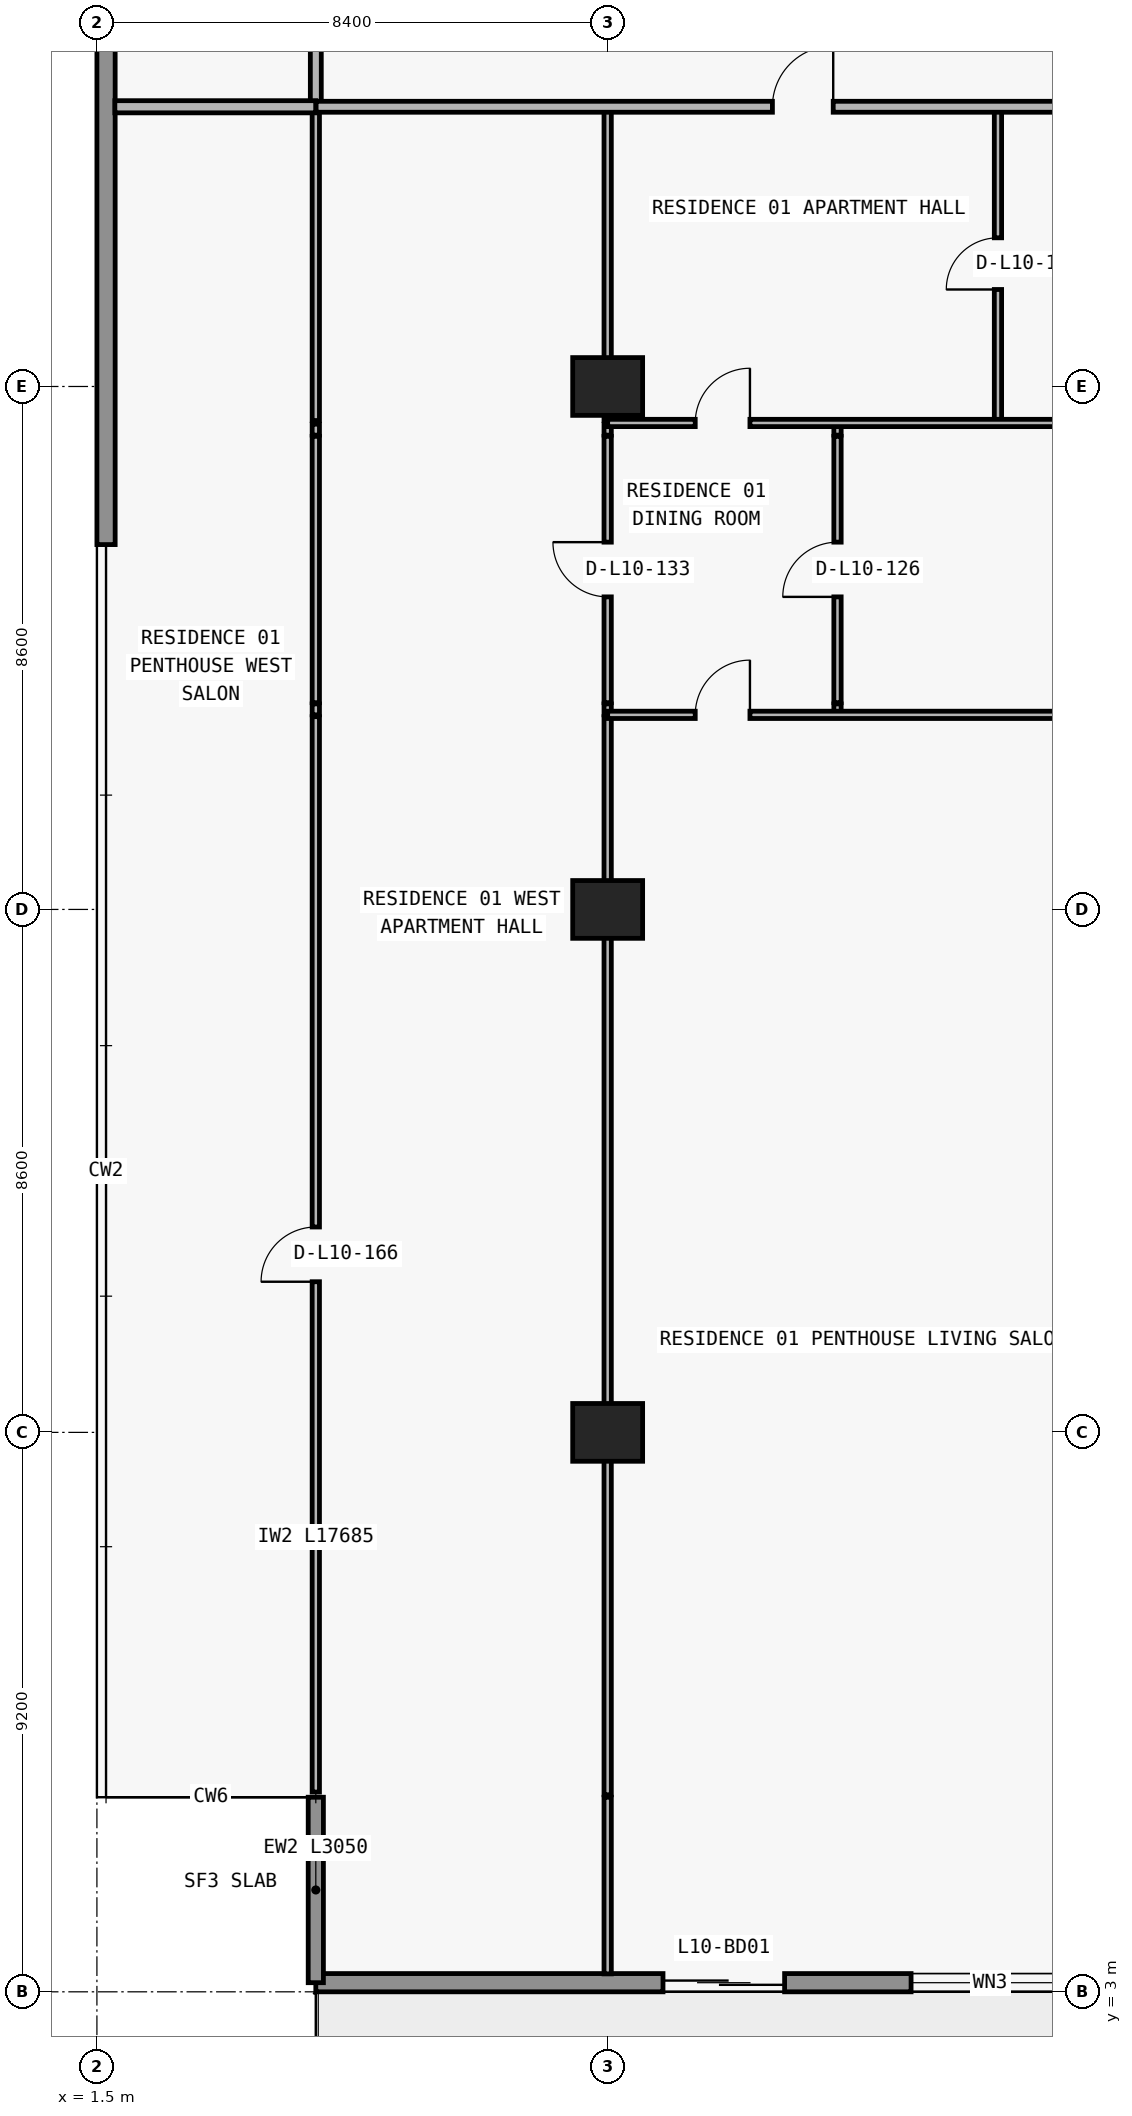
"""IFC4 building model, lengths in metres.
Left out: names, types, materials, properties, quantities, classifications, styles, units other than length and angle.
Written with IfcOpenShell. Run it as: python <this file> out.ifc"""

import sys

from ifc_helpers import new_model, si_unit, direction, frame, frame_2d, origin, origin_2d, place, context, subcontext, project, spatial, rectangle, extrude, element, fill, save


model = new_model("IFC4")
c1 = context("Model", 3, precision=1e-05, world=origin(), true_north=direction((0.0, 1.0)))
c2 = subcontext(c1, "Body", "Model", "MODEL_VIEW")
j1 = project(units=[si_unit("LENGTHUNIT", "METRE"), si_unit("PLANEANGLEUNIT", "RADIAN")], contexts=[c1])
p1 = place(None, origin())
s1 = spatial("IfcSite", under=j1, at=p1, CompositionType="ELEMENT")
p2 = place(p1, origin())
s2 = spatial("IfcBuilding", under=s1, at=p2, CompositionType="ELEMENT")
p3 = place(p2, frame((0.0, 0.0, 43.2)))
s3 = spatial("IfcBuildingStorey", under=s2, at=p3, CompositionType="ELEMENT", Elevation=43.2)
for number, where, z_axis, x_axis in (
    (1, (9.9, 12.2, 0.0), (0.0, 0.0, 1.0), (1.0, 0.0, 0.0)),
    (2, (9.9, 20.8, 0.0), (0.0, 0.0, 1.0), (1.0, 0.0, 0.0)),
    (3, (9.9, 29.4, 0.0), (0.0, 0.0, 1.0), (1.0, 0.0, 0.0)),
):
    element("IfcColumn", number, at=place(p3, frame(where, z_axis=z_axis, x_axis=x_axis)), inside=s3, PredefinedType="COLUMN", context=c2, shape_type="SweptSolid", body=[
        extrude(rectangle(XDim=1.15, YDim=0.95, at=origin_2d()), origin(), (0.0, 0.0, 1.0), 3.05),
    ])
p4 = place(p3, frame((72.7, 3.15, 0.0), z_axis=(0.0, 0.0, 1.0), x_axis=(-1.0, 0.0, 0.0)))
e4 = element("IfcWall", 4, at=p4, inside=s3, PredefinedType="STANDARD", context=c2, shape_type="SweptSolid", body=[
    extrude(rectangle(XDim=67.6, YDim=0.3, at=frame_2d((33.8, 0.0))), origin(), (0.0, 0.0, 1.0), 3.05),
])
p5 = place(p4, frame((59.89, 0.0, 0.0)))
e5 = element("IfcOpeningElement", 5, at=p5, cuts=e4, PredefinedType="OPENING", context=c2, shape_type="SweptSolid", body=[
    extrude(rectangle(XDim=2.0, YDim=2.3, at=frame_2d((1.0, 1.15))), frame((0.0, 0.16, 0.0), z_axis=(0.0, -1.0, 0.0), x_axis=(1.0, 0.0, 0.0)), (0.0, 0.0, 1.0), 0.32),
])
p6 = place(p4, frame((55.21, 0.0, 0.65)))
e6 = element("IfcOpeningElement", 6, at=p6, cuts=e4, PredefinedType="OPENING", context=c2, shape_type="SweptSolid", body=[
    extrude(rectangle(XDim=2.6, YDim=1.85, at=frame_2d((1.3, 0.925))), frame((0.0, 0.16, 0.0), z_axis=(0.0, -1.0, 0.0), x_axis=(1.0, 0.0, 0.0)), (0.0, 0.0, 1.0), 0.32),
])
p7 = place(p4, frame((49.1, 0.0, 0.85)))
e7 = element("IfcOpeningElement", 7, at=p7, cuts=e4, PredefinedType="OPENING", context=c2, shape_type="SweptSolid", body=[
    extrude(rectangle(XDim=2.2, YDim=1.55, at=frame_2d((1.1, 0.775))), frame((0.0, 0.16, 0.0), z_axis=(0.0, -1.0, 0.0), x_axis=(1.0, 0.0, 0.0)), (0.0, 0.0, 1.0), 0.32),
])
p8 = place(p4, frame((42.69, 0.0, 0.0)))
e8 = element("IfcOpeningElement", 8, at=p8, cuts=e4, PredefinedType="OPENING", context=c2, shape_type="SweptSolid", body=[
    extrude(rectangle(XDim=2.0, YDim=2.3, at=frame_2d((1.0, 1.15))), frame((0.0, 0.16, 0.0), z_axis=(0.0, -1.0, 0.0), x_axis=(1.0, 0.0, 0.0)), (0.0, 0.0, 1.0), 0.32),
])
p9 = place(p4, frame((38.59, 0.0, 0.85)))
e9 = element("IfcOpeningElement", 9, at=p9, cuts=e4, PredefinedType="OPENING", context=c2, shape_type="SweptSolid", body=[
    extrude(rectangle(XDim=1.8, YDim=1.55, at=frame_2d((0.9, 0.775))), frame((0.0, 0.16, 0.0), z_axis=(0.0, -1.0, 0.0), x_axis=(1.0, 0.0, 0.0)), (0.0, 0.0, 1.0), 0.32),
])
p10 = place(p4, frame((30.914, 0.0, 0.85)))
e10 = element("IfcOpeningElement", 10, at=p10, cuts=e4, PredefinedType="OPENING", context=c2, shape_type="SweptSolid", body=[
    extrude(rectangle(XDim=2.2, YDim=1.55, at=frame_2d((1.1, 0.775))), frame((0.0, 0.16, 0.0), z_axis=(0.0, -1.0, 0.0), x_axis=(1.0, 0.0, 0.0)), (0.0, 0.0, 1.0), 0.32),
])
p11 = place(p4, frame((26.69, 0.0, 0.0)))
e11 = element("IfcOpeningElement", 11, at=p11, cuts=e4, PredefinedType="OPENING", context=c2, shape_type="SweptSolid", body=[
    extrude(rectangle(XDim=2.0, YDim=2.3, at=frame_2d((1.0, 1.15))), frame((0.0, 0.16, 0.0), z_axis=(0.0, -1.0, 0.0), x_axis=(1.0, 0.0, 0.0)), (0.0, 0.0, 1.0), 0.32),
])
p12 = place(p4, frame((22.59, 0.0, 0.85)))
e12 = element("IfcOpeningElement", 12, at=p12, cuts=e4, PredefinedType="OPENING", context=c2, shape_type="SweptSolid", body=[
    extrude(rectangle(XDim=1.8, YDim=1.55, at=frame_2d((0.9, 0.775))), frame((0.0, 0.16, 0.0), z_axis=(0.0, -1.0, 0.0), x_axis=(1.0, 0.0, 0.0)), (0.0, 0.0, 1.0), 0.32),
])
p13 = place(p4, frame((18.69, 0.0, 0.0)))
e13 = element("IfcOpeningElement", 13, at=p13, cuts=e4, PredefinedType="OPENING", context=c2, shape_type="SweptSolid", body=[
    extrude(rectangle(XDim=2.0, YDim=2.3, at=frame_2d((1.0, 1.15))), frame((0.0, 0.16, 0.0), z_axis=(0.0, -1.0, 0.0), x_axis=(1.0, 0.0, 0.0)), (0.0, 0.0, 1.0), 0.32),
])
p14 = place(p4, frame((14.01, 0.0, 0.65)))
e14 = element("IfcOpeningElement", 14, at=p14, cuts=e4, PredefinedType="OPENING", context=c2, shape_type="SweptSolid", body=[
    extrude(rectangle(XDim=2.6, YDim=1.85, at=frame_2d((1.3, 0.925))), frame((0.0, 0.16, 0.0), z_axis=(0.0, -1.0, 0.0), x_axis=(1.0, 0.0, 0.0)), (0.0, 0.0, 1.0), 0.32),
])
p15 = place(p4, frame((7.9, 0.0, 0.85)))
e15 = element("IfcOpeningElement", 15, at=p15, cuts=e4, PredefinedType="OPENING", context=c2, shape_type="SweptSolid", body=[
    extrude(rectangle(XDim=2.2, YDim=1.55, at=frame_2d((1.1, 0.775))), frame((0.0, 0.16, 0.0), z_axis=(0.0, -1.0, 0.0), x_axis=(1.0, 0.0, 0.0)), (0.0, 0.0, 1.0), 0.32),
])
p16 = place(p3, frame((5.1, 6.2, 0.0), z_axis=(0.0, 0.0, 1.0), x_axis=(0.0, -1.0, 0.0)))
e16 = element("IfcWall", 16, at=p16, inside=s3, PredefinedType="ELEMENTEDWALL", context=c2, shape_type="SweptSolid", body=[
    extrude(rectangle(XDim=3.05, YDim=0.25, at=frame_2d((1.525, 0.0))), origin(), (0.0, 0.0, 1.0), 3.05),
])
p17 = place(p3, frame((1.65, 26.8, 0.0), z_axis=(0.0, 0.0, 1.0), x_axis=(0.0, 1.0, 0.0)))
e17 = element("IfcWall", 17, at=p17, inside=s3, PredefinedType="STANDARD", context=c2, shape_type="SweptSolid", body=[
    extrude(rectangle(XDim=20.6, YDim=0.3, at=frame_2d((10.3, 0.0))), origin(), (0.0, 0.0, 1.0), 3.05),
])
p18 = place(p3, frame((5.1, 6.285, 0.0), z_axis=(0.0, 0.0, 1.0), x_axis=(0.0, 1.0, 0.0)))
e18 = element("IfcWall", 18, at=p18, inside=s3, PredefinedType="PARTITIONING", context=c2, shape_type="SweptSolid", body=[
    extrude(rectangle(XDim=17.685, YDim=0.12, at=frame_2d((8.843, 0.0))), origin(), (0.0, 0.0, 1.0), 3.05),
])
p19 = place(p18, frame((8.393, 0.0, 0.0)))
e19 = element("IfcOpeningElement", 19, at=p19, cuts=e18, PredefinedType="OPENING", context=c2, shape_type="SweptSolid", body=[
    extrude(rectangle(XDim=0.9, YDim=2.15, at=frame_2d((0.45, 1.075))), frame((0.0, 0.07, 0.0), z_axis=(0.0, -1.0, 0.0), x_axis=(1.0, 0.0, 0.0)), (0.0, 0.0, 1.0), 0.14),
])
p20 = place(p3, frame((5.1, 24.0, 0.0), z_axis=(0.0, 0.0, 1.0), x_axis=(0.0, 1.0, 0.0)))
e20 = element("IfcWall", 20, at=p20, inside=s3, PredefinedType="PARTITIONING", context=c2, shape_type="SweptSolid", body=[
    extrude(rectangle(XDim=0.18, YDim=0.12, at=frame_2d((0.09, 0.0))), origin(), (0.0, 0.0, 1.0), 3.05),
])
p21 = place(p3, frame((5.1, 24.2, 0.0), z_axis=(0.0, 0.0, 1.0), x_axis=(0.0, 1.0, 0.0)))
e21 = element("IfcWall", 21, at=p21, inside=s3, PredefinedType="PARTITIONING", context=c2, shape_type="SweptSolid", body=[
    extrude(rectangle(XDim=4.38, YDim=0.12, at=frame_2d((2.19, 0.0))), origin(), (0.0, 0.0, 1.0), 3.05),
])
p22 = place(p3, frame((5.1, 28.6, 0.0), z_axis=(0.0, 0.0, 1.0), x_axis=(0.0, 1.0, 0.0)))
e22 = element("IfcWall", 22, at=p22, inside=s3, PredefinedType="PARTITIONING", context=c2, shape_type="SweptSolid", body=[
    extrude(rectangle(XDim=0.18, YDim=0.12, at=frame_2d((0.09, 0.0))), origin(), (0.0, 0.0, 1.0), 3.05),
])
p23 = place(p3, frame((5.1, 28.84, 0.0), z_axis=(0.0, 0.0, 1.0), x_axis=(0.0, 1.0, 0.0)))
e23 = element("IfcWall", 23, at=p23, inside=s3, PredefinedType="PARTITIONING", context=c2, shape_type="SweptSolid", body=[
    extrude(rectangle(XDim=5.16, YDim=0.12, at=frame_2d((2.58, 0.0))), origin(), (0.0, 0.0, 1.0), 3.05),
])
p24 = place(p3, frame((5.1, 34.005, 0.0), z_axis=(0.0, 0.0, 1.0), x_axis=(0.0, 1.0, 0.0)))
e24 = element("IfcWall", 24, at=p24, inside=s3, PredefinedType="PARTITIONING", context=c2, shape_type="SweptSolid", body=[
    extrude(rectangle(XDim=2.895, YDim=0.18, at=frame_2d((1.448, 0.0))), origin(), (0.0, 0.0, 1.0), 3.05),
])
p25 = place(p3, frame((9.9, 3.295, 0.0), z_axis=(0.0, 0.0, 1.0), x_axis=(0.0, 1.0, 0.0)))
e25 = element("IfcWall", 25, at=p25, inside=s3, PredefinedType="PARTITIONING", context=c2, shape_type="SweptSolid", body=[
    extrude(rectangle(XDim=2.905, YDim=0.12, at=frame_2d((1.453, 0.0))), origin(), (0.0, 0.0, 1.0), 3.05),
])
p26 = place(p3, frame((9.9, 6.24, 0.0), z_axis=(0.0, 0.0, 1.0), x_axis=(0.0, 1.0, 0.0)))
e26 = element("IfcWall", 26, at=p26, inside=s3, PredefinedType="PARTITIONING", context=c2, shape_type="SweptSolid", body=[
    extrude(rectangle(XDim=17.73, YDim=0.12, at=frame_2d((8.865, 0.0))), origin(), (0.0, 0.0, 1.0), 2.11),
])
p27 = place(p3, frame((9.9, 24.0, 0.0), z_axis=(0.0, 0.0, 1.0), x_axis=(0.0, 1.0, 0.0)))
e27 = element("IfcWall", 27, at=p27, inside=s3, PredefinedType="PARTITIONING", context=c2, shape_type="SweptSolid", body=[
    extrude(rectangle(XDim=0.18, YDim=0.12, at=frame_2d((0.09, 0.0))), origin(), (0.0, 0.0, 1.0), 2.11),
])
p28 = place(p3, frame((9.9, 24.2, 0.0), z_axis=(0.0, 0.0, 1.0), x_axis=(0.0, 1.0, 0.0)))
e28 = element("IfcWall", 28, at=p28, inside=s3, PredefinedType="PARTITIONING", context=c2, shape_type="SweptSolid", body=[
    extrude(rectangle(XDim=4.38, YDim=0.12, at=frame_2d((2.19, 0.0))), origin(), (0.0, 0.0, 1.0), 2.11),
])
p29 = place(p28, frame((1.74, 0.0, 0.0)))
e29 = element("IfcOpeningElement", 29, at=p29, cuts=e28, PredefinedType="OPENING", context=c2, shape_type="SweptSolid", body=[
    extrude(rectangle(XDim=0.9, YDim=2.06, at=frame_2d((0.45, 1.03))), frame((0.0, 0.07, 0.0), z_axis=(0.0, -1.0, 0.0), x_axis=(1.0, 0.0, 0.0)), (0.0, 0.0, 1.0), 0.14),
])
p30 = place(p3, frame((9.9, 28.6, 0.0), z_axis=(0.0, 0.0, 1.0), x_axis=(0.0, 1.0, 0.0)))
e30 = element("IfcWall", 30, at=p30, inside=s3, PredefinedType="PARTITIONING", context=c2, shape_type="SweptSolid", body=[
    extrude(rectangle(XDim=0.18, YDim=0.12, at=frame_2d((0.09, 0.0))), origin(), (0.0, 0.0, 1.0), 2.11),
])
p31 = place(p3, frame((9.9, 28.84, 0.0), z_axis=(0.0, 0.0, 1.0), x_axis=(0.0, 1.0, 0.0)))
e31 = element("IfcWall", 31, at=p31, inside=s3, PredefinedType="PARTITIONING", context=c2, shape_type="SweptSolid", body=[
    extrude(rectangle(XDim=5.16, YDim=0.12, at=frame_2d((2.58, 0.0))), origin(), (0.0, 0.0, 1.0), 2.11),
])
p32 = place(p3, frame((13.68, 24.0, 0.0), z_axis=(0.0, 0.0, 1.0), x_axis=(0.0, 1.0, 0.0)))
e32 = element("IfcWall", 32, at=p32, inside=s3, PredefinedType="PARTITIONING", context=c2, shape_type="SweptSolid", body=[
    extrude(rectangle(XDim=0.18, YDim=0.12, at=frame_2d((0.09, 0.0))), origin(), (0.0, 0.0, 1.0), 3.05),
])
p33 = place(p3, frame((13.68, 24.2, 0.0), z_axis=(0.0, 0.0, 1.0), x_axis=(0.0, 1.0, 0.0)))
e33 = element("IfcWall", 33, at=p33, inside=s3, PredefinedType="PARTITIONING", context=c2, shape_type="SweptSolid", body=[
    extrude(rectangle(XDim=4.38, YDim=0.12, at=frame_2d((2.19, 0.0))), origin(), (0.0, 0.0, 1.0), 3.05),
])
p34 = place(p33, frame((1.74, 0.0, 0.0)))
e34 = element("IfcOpeningElement", 34, at=p34, cuts=e33, PredefinedType="OPENING", context=c2, shape_type="SweptSolid", body=[
    extrude(rectangle(XDim=0.9, YDim=2.15, at=frame_2d((0.45, 1.075))), frame((0.0, 0.07, 0.0), z_axis=(0.0, -1.0, 0.0), x_axis=(1.0, 0.0, 0.0)), (0.0, 0.0, 1.0), 0.14),
])
p35 = place(p3, frame((13.68, 28.6, 0.0), z_axis=(0.0, 0.0, 1.0), x_axis=(0.0, 1.0, 0.0)))
e35 = element("IfcWall", 35, at=p35, inside=s3, PredefinedType="PARTITIONING", context=c2, shape_type="SweptSolid", body=[
    extrude(rectangle(XDim=0.18, YDim=0.12, at=frame_2d((0.09, 0.0))), origin(), (0.0, 0.0, 1.0), 3.05),
])
p36 = place(p3, frame((16.319, 28.84, 0.0), z_axis=(0.0, 0.0, 1.0), x_axis=(0.0, 1.0, 0.0)))
e36 = element("IfcWall", 36, at=p36, inside=s3, PredefinedType="PARTITIONING", context=c2, shape_type="SweptSolid", body=[
    extrude(rectangle(XDim=5.16, YDim=0.12, at=frame_2d((2.58, 0.0))), origin(), (0.0, 0.0, 1.0), 3.05),
])
p37 = place(p36, frame((2.155, 0.0, 0.0)))
e37 = element("IfcOpeningElement", 37, at=p37, cuts=e36, PredefinedType="OPENING", context=c2, shape_type="SweptSolid", body=[
    extrude(rectangle(XDim=0.85, YDim=2.1, at=frame_2d((0.425, 1.05))), frame((0.0, 0.07, 0.0), z_axis=(0.0, -1.0, 0.0), x_axis=(1.0, 0.0, 0.0)), (0.0, 0.0, 1.0), 0.14),
])
p38 = place(p3, frame((9.9, 24.0, 0.0), z_axis=(0.0, 0.0, 1.0), x_axis=(1.0, 0.0, 0.0)))
e38 = element("IfcWall", 38, at=p38, inside=s3, PredefinedType="PARTITIONING", context=c2, shape_type="SweptSolid", body=[
    extrude(rectangle(XDim=8.4, YDim=0.12, at=frame_2d((4.2, 0.0))), origin(), (0.0, 0.0, 1.0), 3.05),
])
p39 = place(p38, frame((1.44, 0.0, 0.0)))
e39 = element("IfcOpeningElement", 39, at=p39, cuts=e38, PredefinedType="OPENING", context=c2, shape_type="SweptSolid", body=[
    extrude(rectangle(XDim=0.9, YDim=2.15, at=frame_2d((0.45, 1.075))), frame((0.0, 0.07, 0.0), z_axis=(0.0, -1.0, 0.0), x_axis=(1.0, 0.0, 0.0)), (0.0, 0.0, 1.0), 0.14),
])
p40 = place(p3, frame((9.9, 28.8, 0.0), z_axis=(0.0, 0.0, 1.0), x_axis=(1.0, 0.0, 0.0)))
e40 = element("IfcWall", 40, at=p40, inside=s3, PredefinedType="PARTITIONING", context=c2, shape_type="SweptSolid", body=[
    extrude(rectangle(XDim=8.395, YDim=0.12, at=frame_2d((4.198, 0.0))), origin(), (0.0, 0.0, 1.0), 3.05),
])
p41 = place(p40, frame((1.44, 0.0, 0.0)))
e41 = element("IfcOpeningElement", 41, at=p41, cuts=e40, PredefinedType="OPENING", context=c2, shape_type="SweptSolid", body=[
    extrude(rectangle(XDim=0.9, YDim=2.15, at=frame_2d((0.45, 1.075))), frame((0.0, 0.07, 0.0), z_axis=(0.0, -1.0, 0.0), x_axis=(1.0, 0.0, 0.0)), (0.0, 0.0, 1.0), 0.14),
])
p42 = place(p3, frame((1.795, 34.0, 0.0), z_axis=(0.0, 0.0, 1.0), x_axis=(1.0, 0.0, 0.0)))
e42 = element("IfcWall", 42, at=p42, inside=s3, PredefinedType="PARTITIONING", context=c2, shape_type="SweptSolid", body=[
    extrude(rectangle(XDim=3.305, YDim=0.2, at=frame_2d((1.653, 0.0))), origin(), (0.0, 0.0, 1.0), 3.05),
])
p43 = place(p3, frame((5.105, 34.0, 0.0), z_axis=(0.0, 0.0, 1.0), x_axis=(1.0, 0.0, 0.0)))
e43 = element("IfcWall", 43, at=p43, inside=s3, PredefinedType="PARTITIONING", context=c2, shape_type="SweptSolid", body=[
    extrude(rectangle(XDim=21.545, YDim=0.18, at=frame_2d((10.772, 0.0))), origin(), (0.0, 0.0, 1.0), 3.05),
])
p44 = place(p43, frame((7.504, 0.0, 0.0)))
e44 = element("IfcOpeningElement", 44, at=p44, cuts=e43, PredefinedType="OPENING", context=c2, shape_type="SweptSolid", body=[
    extrude(rectangle(XDim=1.0, YDim=2.2, at=frame_2d((0.5, 1.1))), frame((0.0, 0.1, 0.0), z_axis=(0.0, -1.0, 0.0), x_axis=(1.0, 0.0, 0.0)), (0.0, 0.0, 1.0), 0.2),
])
p45 = place(p5, origin())
e45 = element("IfcDoor", 45, at=p45, inside=s3, OperationType="DOUBLE_DOOR_SLIDING", PredefinedType="DOOR", context=c2, shape_type="SweptSolid", body=[
    extrude(rectangle(XDim=2.0, YDim=2.3, at=frame_2d((1.0, 1.15))), frame((0.0, 0.025, 0.0), z_axis=(0.0, -1.0, 0.0), x_axis=(1.0, 0.0, 0.0)), (0.0, 0.0, 1.0), 0.05),
])
fill(e5, e45)
p46 = place(p6, origin())
e46 = element("IfcWindow", 46, at=p46, inside=s3, PartitioningType="SINGLE_PANEL", PredefinedType="WINDOW", context=c2, shape_type="SweptSolid", body=[
    extrude(rectangle(XDim=2.6, YDim=1.85, at=frame_2d((1.3, 0.925))), frame((0.0, 0.03, 0.0), z_axis=(0.0, -1.0, 0.0), x_axis=(1.0, 0.0, 0.0)), (0.0, 0.0, 1.0), 0.06),
])
fill(e6, e46)
p47 = place(p44, origin())
e47 = element("IfcDoor", 47, at=p47, inside=s3, OperationType="SINGLE_SWING_RIGHT", PredefinedType="DOOR", context=c2, shape_type="SweptSolid", body=[
    extrude(rectangle(XDim=1.0, YDim=2.2, at=frame_2d((0.5, 1.1))), frame((0.0, 0.025, 0.0), z_axis=(0.0, -1.0, 0.0), x_axis=(1.0, 0.0, 0.0)), (0.0, 0.0, 1.0), 0.05),
])
fill(e44, e47)
p48 = place(p37, origin())
e48 = element("IfcDoor", 48, at=p48, inside=s3, OperationType="SINGLE_SWING_LEFT", PredefinedType="DOOR", context=c2, shape_type="SweptSolid", body=[
    extrude(rectangle(XDim=0.85, YDim=2.1, at=frame_2d((0.425, 1.05))), frame((0.0, 0.025, 0.0), z_axis=(0.0, -1.0, 0.0), x_axis=(1.0, 0.0, 0.0)), (0.0, 0.0, 1.0), 0.05),
])
fill(e37, e48)
p49 = place(p41, origin())
e49 = element("IfcDoor", 49, at=p49, inside=s3, OperationType="SINGLE_SWING_RIGHT", PredefinedType="DOOR", context=c2, shape_type="SweptSolid", body=[
    extrude(rectangle(XDim=0.9, YDim=2.15, at=frame_2d((0.45, 1.075))), frame((0.0, 0.025, 0.0), z_axis=(0.0, -1.0, 0.0), x_axis=(1.0, 0.0, 0.0)), (0.0, 0.0, 1.0), 0.05),
])
fill(e41, e49)
p50 = place(p34, origin())
e50 = element("IfcDoor", 50, at=p50, inside=s3, OperationType="SINGLE_SWING_LEFT", PredefinedType="DOOR", context=c2, shape_type="SweptSolid", body=[
    extrude(rectangle(XDim=0.9, YDim=2.15, at=frame_2d((0.45, 1.075))), frame((0.0, 0.025, 0.0), z_axis=(0.0, -1.0, 0.0), x_axis=(1.0, 0.0, 0.0)), (0.0, 0.0, 1.0), 0.05),
])
fill(e34, e50)
p51 = place(p39, origin())
e51 = element("IfcDoor", 51, at=p51, inside=s3, OperationType="SINGLE_SWING_RIGHT", PredefinedType="DOOR", context=c2, shape_type="SweptSolid", body=[
    extrude(rectangle(XDim=0.9, YDim=2.15, at=frame_2d((0.45, 1.075))), frame((0.0, 0.025, 0.0), z_axis=(0.0, -1.0, 0.0), x_axis=(1.0, 0.0, 0.0)), (0.0, 0.0, 1.0), 0.05),
])
fill(e39, e51)
p52 = place(p29, origin())
e52 = element("IfcDoor", 52, at=p52, inside=s3, OperationType="SINGLE_SWING_RIGHT", PredefinedType="DOOR", context=c2, shape_type="SweptSolid", body=[
    extrude(rectangle(XDim=0.9, YDim=2.06, at=frame_2d((0.45, 1.03))), frame((0.0, 0.025, 0.0), z_axis=(0.0, -1.0, 0.0), x_axis=(1.0, 0.0, 0.0)), (0.0, 0.0, 1.0), 0.05),
])
fill(e29, e52)
p53 = place(p19, origin())
e53 = element("IfcDoor", 53, at=p53, inside=s3, OperationType="SINGLE_SWING_LEFT", PredefinedType="DOOR", context=c2, shape_type="SweptSolid", body=[
    extrude(rectangle(XDim=0.9, YDim=2.15, at=frame_2d((0.45, 1.075))), frame((0.0, 0.025, 0.0), z_axis=(0.0, -1.0, 0.0), x_axis=(1.0, 0.0, 0.0)), (0.0, 0.0, 1.0), 0.05),
])
fill(e19, e53)
save(model, sys.argv[1])
